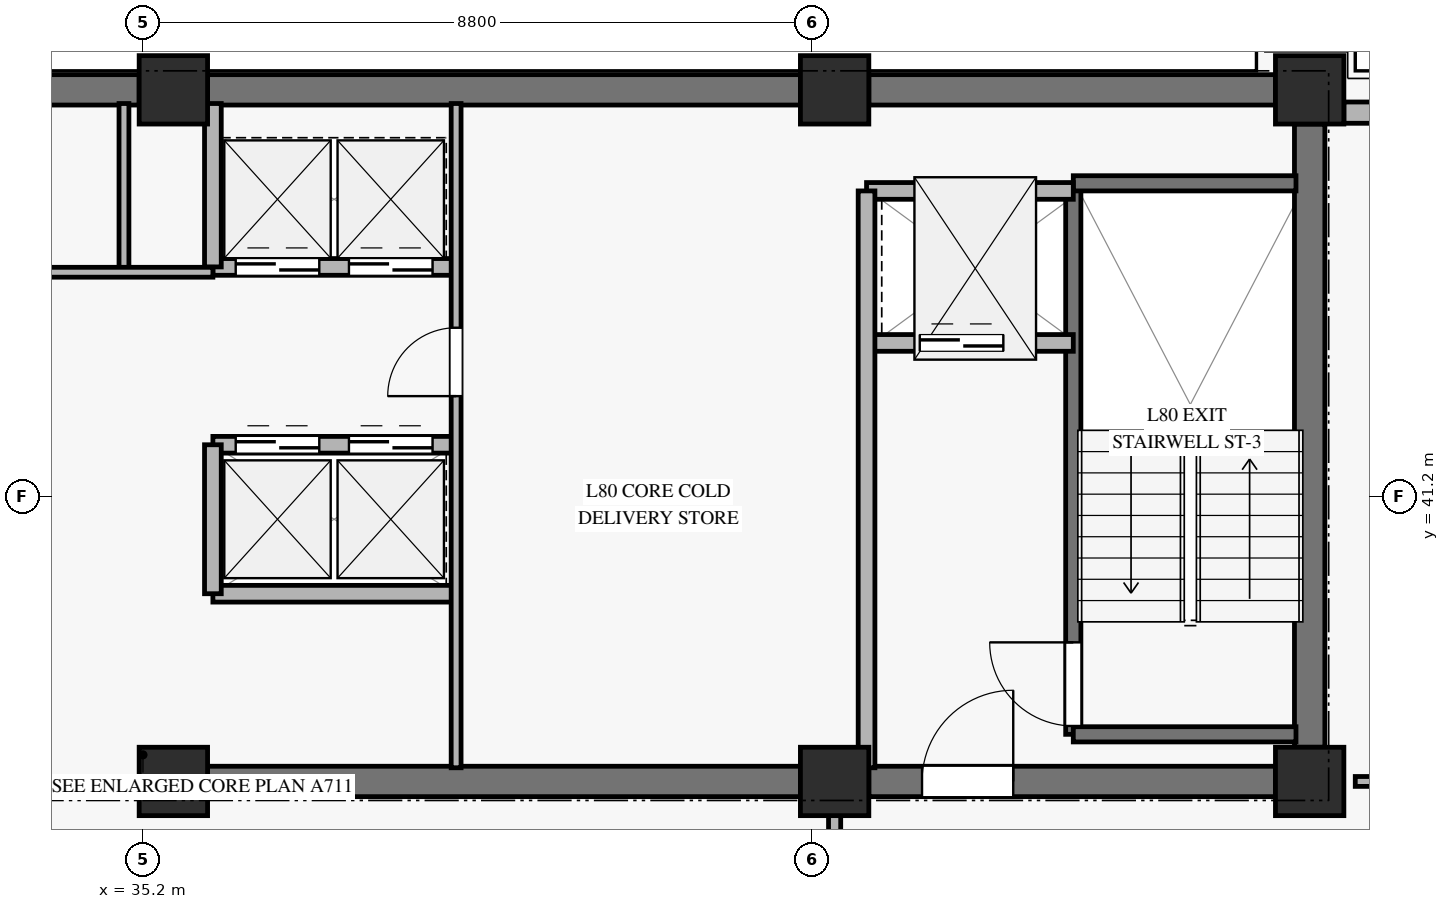
"""IFC4 building model, lengths in metres.
Left out: names, types, materials, properties, quantities, classifications, styles, units other than length and angle.
Written with IfcOpenShell. Run it as: python <this file> out.ifc"""

import sys

from ifc_helpers import new_model, si_unit, direction, frame, frame_2d, origin, origin_2d, place, context, subcontext, project, spatial, rectangle, extrude, source, transform, mapped, element, fill, save


model = new_model("IFC4")
c1 = context("Model", 3, precision=1e-05, world=origin(), true_north=direction((0.0, 1.0)))
c2 = subcontext(c1, "Body", "Model", "MODEL_VIEW")
j1 = project(units=[si_unit("LENGTHUNIT", "METRE"), si_unit("PLANEANGLEUNIT", "RADIAN")], contexts=[c1])
p1 = place(None, origin())
s1 = spatial("IfcSite", under=j1, at=p1, CompositionType="ELEMENT")
p2 = place(p1, origin())
s2 = spatial("IfcBuilding", under=s1, at=p2, CompositionType="ELEMENT")
p3 = place(p2, frame((0.0, 0.0, 310.8)))
s3 = spatial("IfcBuildingStorey", under=s2, at=p3, CompositionType="ELEMENT", Elevation=310.8)
m1 = source(origin(), c2, "Body", "SweptSolid", [
    extrude(rectangle(XDim=0.9, YDim=0.9, at=origin_2d()), origin(), (0.0, 0.0, 1.0), 3.185),
])
for number, where, z_axis, x_axis in (
    (1, (35.6, 37.45, 0.0), (0.0, 0.0, 1.0), (1.0, 0.0, 0.0)),
    (2, (35.6, 46.55, 0.0), (0.0, 0.0, 1.0), (1.0, 0.0, 0.0)),
    (3, (44.3, 37.45, 0.0), (0.0, 0.0, 1.0), (1.0, 0.0, 0.0)),
    (4, (44.3, 46.55, 0.0), (0.0, 0.0, 1.0), (1.0, 0.0, 0.0)),
    (5, (50.55, 37.45, 0.0), (0.0, 0.0, 1.0), (1.0, 0.0, 0.0)),
    (6, (50.55, 46.55, 0.0), (0.0, 0.0, 1.0), (1.0, 0.0, 0.0)),
):
    element("IfcColumn", number, at=place(p3, frame(where, z_axis=z_axis, x_axis=x_axis)), inside=s3, PredefinedType="PILASTER", context=c2, shape_type="MappedRepresentation", body=[
        mapped(m1, transform((0.0, 0.0, 0.0), x_axis=(1.0, 0.0, 0.0), y_axis=(0.0, 1.0, 0.0), z_axis=(0.0, 0.0, 1.0), scale=1.0)),
    ])
p4 = place(p3, frame((31.25, 46.55, 0.0), z_axis=(0.0, 0.0, 1.0), x_axis=(1.0, 0.0, 0.0)))
e7 = element("IfcWall", 7, at=p4, inside=s3, PredefinedType="SHEAR", context=c2, shape_type="SweptSolid", body=[
    extrude(rectangle(XDim=3.9, YDim=0.4, at=frame_2d((1.95, 0.0))), origin(), (0.0, 0.0, 1.0), 3.185),
])
p5 = place(p3, frame((36.05, 46.55, 0.0), z_axis=(0.0, 0.0, 1.0), x_axis=(1.0, 0.0, 0.0)))
e8 = element("IfcWall", 8, at=p5, inside=s3, PredefinedType="SHEAR", context=c2, shape_type="SweptSolid", body=[
    extrude(rectangle(XDim=7.8, YDim=0.4, at=frame_2d((3.9, 0.0))), origin(), (0.0, 0.0, 1.0), 3.185),
])
p6 = place(p3, frame((44.75, 46.55, 0.0), z_axis=(0.0, 0.0, 1.0), x_axis=(1.0, 0.0, 0.0)))
e9 = element("IfcWall", 9, at=p6, inside=s3, PredefinedType="SHEAR", context=c2, shape_type="SweptSolid", body=[
    extrude(rectangle(XDim=5.35, YDim=0.4, at=frame_2d((2.675, 0.0))), origin(), (0.0, 0.0, 1.0), 3.185),
])
p7 = place(p3, frame((36.05, 37.45, 0.0), z_axis=(0.0, 0.0, 1.0), x_axis=(1.0, 0.0, 0.0)))
e10 = element("IfcWall", 10, at=p7, inside=s3, PredefinedType="SHEAR", context=c2, shape_type="SweptSolid", body=[
    extrude(rectangle(XDim=7.8, YDim=0.4, at=frame_2d((3.9, 0.0))), origin(), (0.0, 0.0, 1.0), 3.185),
])
p8 = place(p3, frame((44.75, 37.45, 0.0), z_axis=(0.0, 0.0, 1.0), x_axis=(1.0, 0.0, 0.0)))
e11 = element("IfcWall", 11, at=p8, inside=s3, PredefinedType="SHEAR", context=c2, shape_type="SweptSolid", body=[
    extrude(rectangle(XDim=5.35, YDim=0.4, at=frame_2d((2.675, 0.0))), origin(), (0.0, 0.0, 1.0), 3.185),
])
p9 = place(p8, frame((0.7, 0.0, 0.0)))
e12 = element("IfcOpeningElement", 12, at=p9, cuts=e11, PredefinedType="OPENING", context=c2, shape_type="SweptSolid", body=[
    extrude(rectangle(XDim=1.2, YDim=2.15, at=frame_2d((0.6, 1.075))), frame((0.0, 0.21, 0.0), z_axis=(0.0, -1.0, 0.0), x_axis=(1.0, 0.0, 0.0)), (0.0, 0.0, 1.0), 0.42),
])
p10 = place(p3, frame((50.55, 37.9, 0.0), z_axis=(0.0, 0.0, 1.0), x_axis=(0.0, 1.0, 0.0)))
e13 = element("IfcWall", 13, at=p10, inside=s3, PredefinedType="SHEAR", context=c2, shape_type="SweptSolid", body=[
    extrude(rectangle(XDim=8.2, YDim=0.4, at=frame_2d((4.1, 0.0))), origin(), (0.0, 0.0, 1.0), 3.185),
])
p11 = place(p3, frame((51.0, 46.25, 0.0), z_axis=(0.0, 0.0, 1.0), x_axis=(1.0, 0.0, 0.0)))
e14 = element("IfcWall", 14, at=p11, inside=s3, PredefinedType="SOLIDWALL", context=c2, shape_type="SweptSolid", body=[
    extrude(rectangle(XDim=6.375, YDim=0.28, at=frame_2d((3.188, 0.0))), origin(), (0.0, 0.0, 1.0), 2.815),
])
p12 = place(p11, frame((2.388, 0.0, 0.45)))
e15 = element("IfcOpeningElement", 15, at=p12, cuts=e14, PredefinedType="OPENING", context=c2, shape_type="SweptSolid", body=[
    extrude(rectangle(XDim=1.6, YDim=2.0, at=frame_2d((0.8, 1.0))), frame((0.0, 0.15, 0.0), z_axis=(0.0, -1.0, 0.0), x_axis=(1.0, 0.0, 0.0)), (0.0, 0.0, 1.0), 0.3),
])
p13 = place(p3, frame((47.44, 38.07, 0.0), z_axis=(0.0, 0.0, 1.0), x_axis=(0.0, 1.0, 0.0)))
e16 = element("IfcWall", 16, at=p13, inside=s3, PredefinedType="SOLIDWALL", context=c2, shape_type="SweptSolid", body=[
    extrude(rectangle(XDim=7.25, YDim=0.2, at=frame_2d((3.625, 0.0))), origin(), (0.0, 0.0, 1.0), 3.4),
])
p14 = place(p13, frame((0.11, 0.0, 0.0)))
e17 = element("IfcOpeningElement", 17, at=p14, cuts=e16, PredefinedType="OPENING", context=c2, shape_type="SweptSolid", body=[
    extrude(rectangle(XDim=1.1, YDim=2.15, at=frame_2d((0.55, 1.075))), frame((0.0, 0.11, 0.0), z_axis=(0.0, -1.0, 0.0), x_axis=(1.0, 0.0, 0.0)), (0.0, 0.0, 1.0), 0.22),
])
for number, where, z_axis, x_axis in (
    (18, (47.44, 45.32, 0.0), (0.0, 0.0, 1.0), (1.0, 0.0, 0.0)),
    (19, (47.44, 38.07, 0.0), (0.0, 0.0, 1.0), (1.0, 0.0, 0.0)),
):
    element("IfcWall", number, at=place(p3, frame(where, z_axis=z_axis, x_axis=x_axis)), inside=s3, PredefinedType="SOLIDWALL", context=c2, shape_type="SweptSolid", body=[
        extrude(rectangle(XDim=2.93, YDim=0.2, at=frame_2d((1.465, 0.0))), origin(), (0.0, 0.0, 1.0), 3.4),
    ])
p15 = place(p3, frame((44.72, 43.22, 0.0), z_axis=(0.0, 0.0, 1.0), x_axis=(1.0, 0.0, 0.0)))
e20 = element("IfcWall", 20, at=p15, inside=s3, PredefinedType="SOLIDWALL", context=c2, shape_type="SweptSolid", body=[
    extrude(rectangle(XDim=2.72, YDim=0.22, at=frame_2d((1.36, 0.0))), origin(), (0.0, 0.0, 1.0), 3.185),
])
p16 = place(p15, frame((0.7, 0.0, 0.0)))
e21 = element("IfcOpeningElement", 21, at=p16, cuts=e20, PredefinedType="OPENING", context=c2, shape_type="SweptSolid", body=[
    extrude(rectangle(XDim=1.1, YDim=2.2, at=frame_2d((0.55, 1.1))), frame((0.0, 0.12, 0.0), z_axis=(0.0, -1.0, 0.0), x_axis=(1.0, 0.0, 0.0)), (0.0, 0.0, 1.0), 0.24),
])
p17 = place(p3, frame((44.72, 45.22, 0.0), z_axis=(0.0, 0.0, 1.0), x_axis=(1.0, 0.0, 0.0)))
e22 = element("IfcWall", 22, at=p17, inside=s3, PredefinedType="SOLIDWALL", context=c2, shape_type="SweptSolid", body=[
    extrude(rectangle(XDim=2.72, YDim=0.22, at=frame_2d((1.36, 0.0))), origin(), (0.0, 0.0, 1.0), 3.185),
])
p18 = place(p3, frame((44.72, 37.63, 0.0), z_axis=(0.0, 0.0, 1.0), x_axis=(0.0, 1.0, 0.0)))
e23 = element("IfcWall", 23, at=p18, inside=s3, PredefinedType="SOLIDWALL", context=c2, shape_type="SweptSolid", body=[
    extrude(rectangle(XDim=7.59, YDim=0.22, at=frame_2d((3.795, 0.0))), origin(), (0.0, 0.0, 1.0), 3.185),
])
p19 = place(p3, frame((36.12, 44.22, 0.0), z_axis=(0.0, 0.0, 1.0), x_axis=(1.0, 0.0, 0.0)))
e24 = element("IfcWall", 24, at=p19, inside=s3, PredefinedType="SOLIDWALL", context=c2, shape_type="SweptSolid", body=[
    extrude(rectangle(XDim=3.2, YDim=0.22, at=frame_2d((1.6, 0.0))), origin(), (0.0, 0.0, 1.0), 3.185),
])
p20 = place(p19, frame((0.3, 0.0, 0.0)))
e25 = element("IfcOpeningElement", 25, at=p20, cuts=e24, PredefinedType="OPENING", context=c2, shape_type="SweptSolid", body=[
    extrude(rectangle(XDim=1.1, YDim=2.2, at=frame_2d((0.55, 1.1))), frame((0.0, 0.12, 0.0), z_axis=(0.0, -1.0, 0.0), x_axis=(1.0, 0.0, 0.0)), (0.0, 0.0, 1.0), 0.24),
])
p21 = place(p19, frame((1.79, 0.0, 0.0)))
e26 = element("IfcOpeningElement", 26, at=p21, cuts=e24, PredefinedType="OPENING", context=c2, shape_type="SweptSolid", body=[
    extrude(rectangle(XDim=1.1, YDim=2.2, at=frame_2d((0.55, 1.1))), frame((0.0, 0.12, 0.0), z_axis=(0.0, -1.0, 0.0), x_axis=(1.0, 0.0, 0.0)), (0.0, 0.0, 1.0), 0.24),
])
p22 = place(p3, frame((36.12, 41.88, 0.0), z_axis=(0.0, 0.0, 1.0), x_axis=(1.0, 0.0, 0.0)))
e27 = element("IfcWall", 27, at=p22, inside=s3, PredefinedType="SOLIDWALL", context=c2, shape_type="SweptSolid", body=[
    extrude(rectangle(XDim=3.2, YDim=0.22, at=frame_2d((1.6, 0.0))), origin(), (0.0, 0.0, 1.0), 3.185),
])
p23 = place(p22, frame((0.3, 0.0, 0.0)))
e28 = element("IfcOpeningElement", 28, at=p23, cuts=e27, PredefinedType="OPENING", context=c2, shape_type="SweptSolid", body=[
    extrude(rectangle(XDim=1.1, YDim=2.2, at=frame_2d((0.55, 1.1))), frame((0.0, 0.12, 0.0), z_axis=(0.0, -1.0, 0.0), x_axis=(1.0, 0.0, 0.0)), (0.0, 0.0, 1.0), 0.24),
])
p24 = place(p22, frame((1.79, 0.0, 0.0)))
e29 = element("IfcOpeningElement", 29, at=p24, cuts=e27, PredefinedType="OPENING", context=c2, shape_type="SweptSolid", body=[
    extrude(rectangle(XDim=1.1, YDim=2.2, at=frame_2d((0.55, 1.1))), frame((0.0, 0.12, 0.0), z_axis=(0.0, -1.0, 0.0), x_axis=(1.0, 0.0, 0.0)), (0.0, 0.0, 1.0), 0.24),
])
p25 = place(p3, frame((36.12, 39.92, 0.0), z_axis=(0.0, 0.0, 1.0), x_axis=(1.0, 0.0, 0.0)))
e30 = element("IfcWall", 30, at=p25, inside=s3, PredefinedType="SOLIDWALL", context=c2, shape_type="SweptSolid", body=[
    extrude(rectangle(XDim=3.2, YDim=0.22, at=frame_2d((1.6, 0.0))), origin(), (0.0, 0.0, 1.0), 3.185),
])
p26 = place(p3, frame((36.12, 39.92, 0.0), z_axis=(0.0, 0.0, 1.0), x_axis=(0.0, 1.0, 0.0)))
e31 = element("IfcWall", 31, at=p26, inside=s3, PredefinedType="SOLIDWALL", context=c2, shape_type="SweptSolid", body=[
    extrude(rectangle(XDim=1.96, YDim=0.22, at=frame_2d((0.98, 0.0))), origin(), (0.0, 0.0, 1.0), 3.185),
])
p27 = place(p3, frame((36.12, 44.22, 0.0), z_axis=(0.0, 0.0, 1.0), x_axis=(0.0, 1.0, 0.0)))
e32 = element("IfcWall", 32, at=p27, inside=s3, PredefinedType="SOLIDWALL", context=c2, shape_type="SweptSolid", body=[
    extrude(rectangle(XDim=2.15, YDim=0.22, at=frame_2d((1.075, 0.0))), origin(), (0.0, 0.0, 1.0), 3.185),
])
p28 = place(p3, frame((34.95, 44.15, 0.0), z_axis=(0.0, 0.0, 1.0), x_axis=(0.0, 1.0, 0.0)))
e33 = element("IfcWall", 33, at=p28, inside=s3, PredefinedType="PARTITIONING", context=c2, shape_type="SweptSolid", body=[
    extrude(rectangle(XDim=2.22, YDim=0.13, at=frame_2d((1.11, 0.0))), origin(), (0.0, 0.0, 1.0), 3.185),
])
p29 = place(p3, frame((33.18, 44.15, 0.0), z_axis=(0.0, 0.0, 1.0), x_axis=(1.0, 0.0, 0.0)))
e34 = element("IfcWall", 34, at=p29, inside=s3, PredefinedType="PARTITIONING", context=c2, shape_type="SweptSolid", body=[
    extrude(rectangle(XDim=2.94, YDim=0.13, at=frame_2d((1.47, 0.0))), origin(), (0.0, 0.0, 1.0), 2.47),
])
p30 = place(p3, frame((39.32, 37.63, 0.0), z_axis=(0.0, 0.0, 1.0), x_axis=(0.0, 1.0, 0.0)))
e35 = element("IfcWall", 35, at=p30, inside=s3, PredefinedType="PARTITIONING", context=c2, shape_type="SweptSolid", body=[
    extrude(rectangle(XDim=8.74, YDim=0.13, at=frame_2d((4.37, 0.0))), origin(), (0.0, 0.0, 1.0), 3.185),
])
p31 = place(p30, frame((4.89, 0.0, 0.0)))
e36 = element("IfcOpeningElement", 36, at=p31, cuts=e35, PredefinedType="OPENING", context=c2, shape_type="SweptSolid", body=[
    extrude(rectangle(XDim=0.9, YDim=2.1, at=frame_2d((0.45, 1.05))), frame((0.0, 0.075, 0.0), z_axis=(0.0, -1.0, 0.0), x_axis=(1.0, 0.0, 0.0)), (0.0, 0.0, 1.0), 0.15),
])
p32 = place(p3, frame((44.3, 19.772, 0.0), z_axis=(0.0, 0.0, 1.0), x_axis=(0.0, 1.0, 0.0)))
e37 = element("IfcWall", 37, at=p32, inside=s3, PredefinedType="PARTITIONING", context=c2, shape_type="SweptSolid", body=[
    extrude(rectangle(XDim=17.678, YDim=0.16, at=frame_2d((8.839, 0.0))), origin(), (0.0, 0.0, 1.0), 2.47),
])
p33 = place(p32, frame((15.348, 0.0, 0.0)))
e38 = element("IfcOpeningElement", 38, at=p33, cuts=e37, PredefinedType="OPENING", context=c2, shape_type="SweptSolid", body=[
    extrude(rectangle(XDim=1.05, YDim=2.15, at=frame_2d((0.525, 1.075))), frame((0.0, 0.09, 0.0), z_axis=(0.0, -1.0, 0.0), x_axis=(1.0, 0.0, 0.0)), (0.0, 0.0, 1.0), 0.18),
])
p34 = place(p3, frame((51.15, 37.45, 0.0), z_axis=(0.0, 0.0, 1.0), x_axis=(1.0, 0.0, 0.0)))
e39 = element("IfcWall", 39, at=p34, inside=s3, PredefinedType="PARTITIONING", context=c2, shape_type="SweptSolid", body=[
    extrude(rectangle(XDim=8.81, YDim=0.13, at=frame_2d((4.405, 0.0))), origin(), (0.0, 0.0, 1.0), 2.82),
])
p35 = place(p34, frame((0.5, 0.0, 0.0)))
e40 = element("IfcOpeningElement", 40, at=p35, cuts=e39, PredefinedType="OPENING", context=c2, shape_type="SweptSolid", body=[
    extrude(rectangle(XDim=0.9, YDim=2.1, at=frame_2d((0.45, 1.05))), frame((0.0, 0.075, 0.0), z_axis=(0.0, -1.0, 0.0), x_axis=(1.0, 0.0, 0.0)), (0.0, 0.0, 1.0), 0.15),
])
p36 = place(p34, frame((6.317, 0.0, 0.0)))
e41 = element("IfcOpeningElement", 41, at=p36, cuts=e39, PredefinedType="OPENING", context=c2, shape_type="SweptSolid", body=[
    extrude(rectangle(XDim=0.95, YDim=2.1, at=frame_2d((0.475, 1.05))), frame((0.0, 0.075, 0.0), z_axis=(0.0, -1.0, 0.0), x_axis=(1.0, 0.0, 0.0)), (0.0, 0.0, 1.0), 0.15),
])
m2 = source(origin(), c2, "Body", "SweptSolid", [
    extrude(rectangle(XDim=1.1, YDim=2.15, at=frame_2d((0.55, 1.075))), frame((0.0, 0.025, 0.0), z_axis=(0.0, -1.0, 0.0), x_axis=(1.0, 0.0, 0.0)), (0.0, 0.0, 1.0), 0.05),
])
p37 = place(p14, origin())
e42 = element("IfcDoor", 42, at=p37, inside=s3, OperationType="SINGLE_SWING_RIGHT", PredefinedType="DOOR", context=c2, shape_type="MappedRepresentation", body=[
    mapped(m2, transform((0.0, 0.0, 0.0), x_axis=(1.0, 0.0, 0.0), y_axis=(0.0, 1.0, 0.0), z_axis=(0.0, 0.0, 1.0), scale=1.0)),
])
fill(e17, e42)
m3 = source(origin(), c2, "Body", "SweptSolid", [
    extrude(rectangle(XDim=1.1, YDim=2.2, at=frame_2d((0.55, 1.1))), frame((0.0, 0.025, 0.0), z_axis=(0.0, -1.0, 0.0), x_axis=(1.0, 0.0, 0.0)), (0.0, 0.0, 1.0), 0.05),
])
p38 = place(p16, origin())
e43 = element("IfcDoor", 43, at=p38, inside=s3, OperationType="SLIDING_TO_LEFT", PredefinedType="DOOR", context=c2, shape_type="MappedRepresentation", body=[
    mapped(m3, transform((0.0, 0.0, 0.0), x_axis=(1.0, 0.0, 0.0), y_axis=(0.0, 1.0, 0.0), z_axis=(0.0, 0.0, 1.0), scale=1.0)),
])
fill(e21, e43)
m4 = source(origin(), c2, "Body", "SweptSolid", [
    extrude(rectangle(XDim=1.2, YDim=2.15, at=frame_2d((0.6, 1.075))), frame((0.0, 0.025, 0.0), z_axis=(0.0, -1.0, 0.0), x_axis=(1.0, 0.0, 0.0)), (0.0, 0.0, 1.0), 0.05),
])
p39 = place(p9, origin())
e44 = element("IfcDoor", 44, at=p39, inside=s3, OperationType="SINGLE_SWING_RIGHT", PredefinedType="DOOR", context=c2, shape_type="MappedRepresentation", body=[
    mapped(m4, transform((0.0, 0.0, 0.0), x_axis=(1.0, 0.0, 0.0), y_axis=(0.0, 1.0, 0.0), z_axis=(0.0, 0.0, 1.0), scale=1.0)),
])
fill(e12, e44)
p40 = place(p20, origin())
e45 = element("IfcDoor", 45, at=p40, inside=s3, OperationType="SLIDING_TO_LEFT", PredefinedType="DOOR", context=c2, shape_type="MappedRepresentation", body=[
    mapped(m3, transform((0.0, 0.0, 0.0), x_axis=(1.0, 0.0, 0.0), y_axis=(0.0, 1.0, 0.0), z_axis=(0.0, 0.0, 1.0), scale=1.0)),
])
fill(e25, e45)
p41 = place(p21, origin())
e46 = element("IfcDoor", 46, at=p41, inside=s3, OperationType="SLIDING_TO_LEFT", PredefinedType="DOOR", context=c2, shape_type="MappedRepresentation", body=[
    mapped(m3, transform((0.0, 0.0, 0.0), x_axis=(1.0, 0.0, 0.0), y_axis=(0.0, 1.0, 0.0), z_axis=(0.0, 0.0, 1.0), scale=1.0)),
])
fill(e26, e46)
p42 = place(p23, origin())
e47 = element("IfcDoor", 47, at=p42, inside=s3, OperationType="SLIDING_TO_LEFT", PredefinedType="DOOR", context=c2, shape_type="MappedRepresentation", body=[
    mapped(m3, transform((0.0, 0.0, 0.0), x_axis=(1.0, 0.0, 0.0), y_axis=(0.0, 1.0, 0.0), z_axis=(0.0, 0.0, 1.0), scale=1.0)),
])
fill(e28, e47)
p43 = place(p24, origin())
e48 = element("IfcDoor", 48, at=p43, inside=s3, OperationType="SLIDING_TO_LEFT", PredefinedType="DOOR", context=c2, shape_type="MappedRepresentation", body=[
    mapped(m3, transform((0.0, 0.0, 0.0), x_axis=(1.0, 0.0, 0.0), y_axis=(0.0, 1.0, 0.0), z_axis=(0.0, 0.0, 1.0), scale=1.0)),
])
fill(e29, e48)
m5 = source(origin(), c2, "Body", "SweptSolid", [
    extrude(rectangle(XDim=0.9, YDim=2.1, at=frame_2d((0.45, 1.05))), frame((0.0, 0.025, 0.0), z_axis=(0.0, -1.0, 0.0), x_axis=(1.0, 0.0, 0.0)), (0.0, 0.0, 1.0), 0.05),
])
p44 = place(p31, origin())
e49 = element("IfcDoor", 49, at=p44, inside=s3, OperationType="SINGLE_SWING_LEFT", PredefinedType="DOOR", context=c2, shape_type="MappedRepresentation", body=[
    mapped(m5, transform((0.0, 0.0, 0.0), x_axis=(1.0, 0.0, 0.0), y_axis=(0.0, 1.0, 0.0), z_axis=(0.0, 0.0, 1.0), scale=1.0)),
])
fill(e36, e49)
save(model, sys.argv[1])
